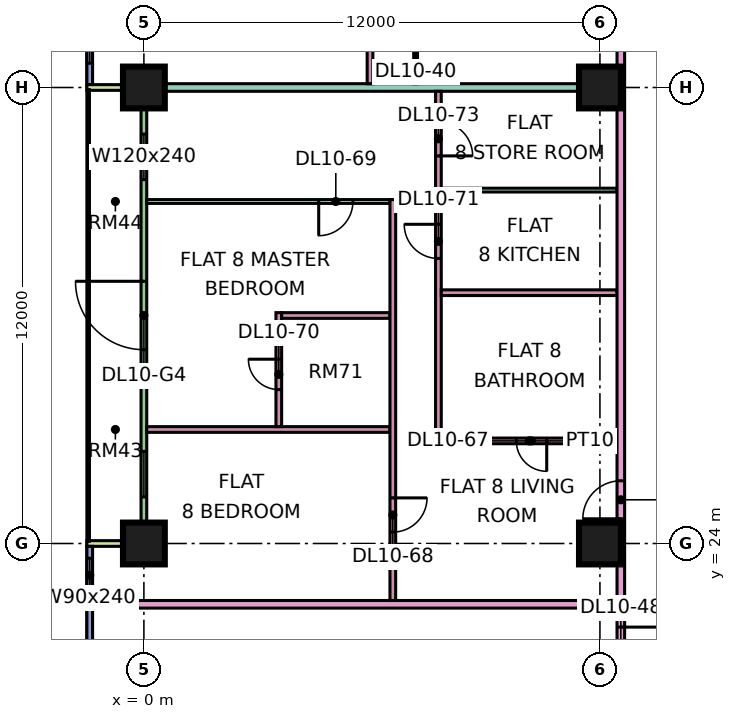
"""IFC4 building model, lengths in metres.
Left out: names, types, materials, properties, quantities, classifications, styles, units other than length and angle.
Written with IfcOpenShell. Run it as: python <this file> out.ifc"""

import sys

from ifc_helpers import new_model, si_unit, direction, frame, frame_2d, origin, origin_2d, place, context, subcontext, project, spatial, rectangle, extrude, element, fill, save


model = new_model("IFC4")
c1 = context("Model", 3, precision=1e-05, world=origin(), true_north=direction((0.0, 1.0)))
c2 = subcontext(c1, "Body", "Model", "MODEL_VIEW")
j1 = project(units=[si_unit("LENGTHUNIT", "METRE"), si_unit("PLANEANGLEUNIT", "RADIAN")], contexts=[c1])
p1 = place(None, origin())
s1 = spatial("IfcSite", under=j1, at=p1, CompositionType="ELEMENT")
p2 = place(p1, origin())
s2 = spatial("IfcBuilding", under=s1, at=p2, CompositionType="ELEMENT")
p3 = place(p2, frame((0.0, 0.0, 52.65)))
s3 = spatial("IfcBuildingStorey", under=s2, at=p3, CompositionType="ELEMENT", Elevation=52.65)
p4 = place(p3, frame((0.0, 24.0, 0.0), z_axis=(0.0, 0.0, 1.0), x_axis=(1.0, 0.0, 0.0)))
e1 = element("IfcColumn", 1, at=p4, inside=s3, PredefinedType="COLUMN", context=c2, shape_type="SweptSolid", body=[
    extrude(rectangle(XDim=1.1, YDim=1.1, at=origin_2d()), origin(), (0.0, 0.0, 1.0), 3.75),
])
p5 = place(p3, frame((0.0, 36.0, 0.0), z_axis=(0.0, 0.0, 1.0), x_axis=(1.0, 0.0, 0.0)))
e2 = element("IfcColumn", 2, at=p5, inside=s3, PredefinedType="COLUMN", context=c2, shape_type="SweptSolid", body=[
    extrude(rectangle(XDim=1.1, YDim=1.1, at=origin_2d()), origin(), (0.0, 0.0, 1.0), 3.75),
])
for number, where, z_axis, x_axis in (
    (3, (12.0, 24.0, 0.0), (0.0, 0.0, 1.0), (1.0, 0.0, 0.0)),
    (4, (12.0, 36.0, 0.0), (0.0, 0.0, 1.0), (1.0, 0.0, 0.0)),
):
    element("IfcColumn", number, at=place(p3, frame(where, z_axis=z_axis, x_axis=x_axis)), inside=s3, PredefinedType="COLUMN", context=c2, shape_type="SweptSolid", body=[
        extrude(rectangle(XDim=1.1, YDim=1.1, at=origin_2d()), origin(), (0.0, 0.0, 1.0), 3.75),
    ])
p6 = place(p3, frame((-1.425, 47.925, 0.0), z_axis=(0.0, 0.0, 1.0), x_axis=(0.0, -1.0, 0.0)))
e5 = element("IfcWall", 5, at=p6, inside=s3, PredefinedType="SOLIDWALL", context=c2, shape_type="SweptSolid", body=[
    extrude(rectangle(XDim=11.85, YDim=0.15, at=frame_2d((5.925, 0.0))), origin(), (0.0, 0.0, 1.0), 3.35),
])
p7 = place(p6, frame((0.562, 0.0, 0.45)))
e6 = element("IfcOpeningElement", 6, at=p7, cuts=e5, PredefinedType="OPENING", context=c2, shape_type="SweptSolid", body=[
    extrude(rectangle(XDim=1.8, YDim=2.4, at=frame_2d((0.9, 1.2))), frame((0.0, 0.085, 0.0), z_axis=(0.0, -1.0, 0.0), x_axis=(1.0, 0.0, 0.0)), (0.0, 0.0, 1.0), 0.17),
])
p8 = place(p6, frame((4.425, 0.0, 0.45)))
e7 = element("IfcOpeningElement", 7, at=p8, cuts=e5, PredefinedType="OPENING", context=c2, shape_type="SweptSolid", body=[
    extrude(rectangle(XDim=3.0, YDim=2.4, at=frame_2d((1.5, 1.2))), frame((0.0, 0.085, 0.0), z_axis=(0.0, -1.0, 0.0), x_axis=(1.0, 0.0, 0.0)), (0.0, 0.0, 1.0), 0.17),
])
p9 = place(p6, frame((9.488, 0.0, 0.45)))
e8 = element("IfcOpeningElement", 8, at=p9, cuts=e5, PredefinedType="OPENING", context=c2, shape_type="SweptSolid", body=[
    extrude(rectangle(XDim=1.8, YDim=2.4, at=frame_2d((0.9, 1.2))), frame((0.0, 0.085, 0.0), z_axis=(0.0, -1.0, 0.0), x_axis=(1.0, 0.0, 0.0)), (0.0, 0.0, 1.0), 0.17),
])
p10 = place(p3, frame((0.0, 35.925, 0.0), z_axis=(0.0, 0.0, 1.0), x_axis=(0.0, -1.0, 0.0)))
e9 = element("IfcWall", 9, at=p10, inside=s3, PredefinedType="SOLIDWALL", context=c2, shape_type="SweptSolid", body=[
    extrude(rectangle(XDim=11.85, YDim=0.15, at=frame_2d((5.925, 0.0))), origin(), (0.0, 0.0, 1.0), 3.35),
])
p11 = place(p10, frame((1.15, 0.0, 0.45)))
e10 = element("IfcOpeningElement", 10, at=p11, cuts=e9, PredefinedType="OPENING", context=c2, shape_type="SweptSolid", body=[
    extrude(rectangle(XDim=1.2, YDim=2.4, at=frame_2d((0.6, 1.2))), frame((0.0, 0.085, 0.0), z_axis=(0.0, -1.0, 0.0), x_axis=(1.0, 0.0, 0.0)), (0.0, 0.0, 1.0), 0.17),
])
p12 = place(p10, frame((5.025, 0.0, 0.0)))
e11 = element("IfcOpeningElement", 11, at=p12, cuts=e9, PredefinedType="OPENING", context=c2, shape_type="SweptSolid", body=[
    extrude(rectangle(XDim=1.8, YDim=2.4, at=frame_2d((0.9, 1.2))), frame((0.0, 0.085, 0.0), z_axis=(0.0, -1.0, 0.0), x_axis=(1.0, 0.0, 0.0)), (0.0, 0.0, 1.0), 0.17),
])
p13 = place(p10, frame((9.5, 0.0, 0.45)))
e12 = element("IfcOpeningElement", 12, at=p13, cuts=e9, PredefinedType="OPENING", context=c2, shape_type="SweptSolid", body=[
    extrude(rectangle(XDim=1.2, YDim=2.4, at=frame_2d((0.6, 1.2))), frame((0.0, 0.085, 0.0), z_axis=(0.0, -1.0, 0.0), x_axis=(1.0, 0.0, 0.0)), (0.0, 0.0, 1.0), 0.17),
])
for number, where, z_axis, x_axis in (
    (13, (-1.5, 36.0, 0.0), (0.0, 0.0, 1.0), (1.0, 0.0, 0.0)),
    (14, (-1.5, 24.0, 0.0), (0.0, 0.0, 1.0), (1.0, 0.0, 0.0)),
):
    element("IfcWall", number, at=place(p3, frame(where, z_axis=z_axis, x_axis=x_axis)), inside=s3, PredefinedType="SOLIDWALL", context=c2, shape_type="SweptSolid", body=[
        extrude(rectangle(XDim=1.5, YDim=0.15, at=frame_2d((0.75, 0.0))), origin(), (0.0, 0.0, 1.0), 3.35),
    ])
p14 = place(p3, frame((-1.425, 23.925, 0.0), z_axis=(0.0, 0.0, 1.0), x_axis=(0.0, -1.0, 0.0)))
e15 = element("IfcWall", 15, at=p14, inside=s3, PredefinedType="SOLIDWALL", context=c2, shape_type="SweptSolid", body=[
    extrude(rectangle(XDim=11.425, YDim=0.15, at=frame_2d((5.712, 0.0))), origin(), (0.0, 0.0, 1.0), 3.35),
])
p15 = place(p14, frame((0.312, 0.0, 0.45)))
e16 = element("IfcOpeningElement", 16, at=p15, cuts=e15, PredefinedType="OPENING", context=c2, shape_type="SweptSolid", body=[
    extrude(rectangle(XDim=0.9, YDim=2.4, at=frame_2d((0.45, 1.2))), frame((0.0, 0.085, 0.0), z_axis=(0.0, -1.0, 0.0), x_axis=(1.0, 0.0, 0.0)), (0.0, 0.0, 1.0), 0.17),
])
p16 = place(p14, frame((6.175, 0.0, 0.45)))
e17 = element("IfcOpeningElement", 17, at=p16, cuts=e15, PredefinedType="OPENING", context=c2, shape_type="SweptSolid", body=[
    extrude(rectangle(XDim=3.0, YDim=2.4, at=frame_2d((1.5, 1.2))), frame((0.0, 0.085, 0.0), z_axis=(0.0, -1.0, 0.0), x_axis=(1.0, 0.0, 0.0)), (0.0, 0.0, 1.0), 0.17),
])
p17 = place(p3, frame((-1.35, 22.4, 0.0), z_axis=(0.0, 0.0, 1.0), x_axis=(1.0, 0.0, 0.0)))
e18 = element("IfcWall", 18, at=p17, inside=s3, PredefinedType="PARTITIONING", context=c2, shape_type="SweptSolid", body=[
    extrude(rectangle(XDim=13.8, YDim=0.2, at=frame_2d((6.9, 0.0))), origin(), (0.0, 0.0, 1.0), 3.35),
])
e19 = element("IfcWall", 19, at=p5, inside=s3, PredefinedType="PARTITIONING", context=c2, shape_type="SweptSolid", body=[
    extrude(rectangle(XDim=12.45, YDim=0.2, at=frame_2d((6.225, 0.0))), origin(), (0.0, 0.0, 1.0), 3.35),
])
p18 = place(p3, frame((0.074, 27.0, 0.0), z_axis=(0.0, 0.0, 1.0), x_axis=(1.0, 0.0, 0.0)))
e20 = element("IfcWall", 20, at=p18, inside=s3, PredefinedType="PARTITIONING", context=c2, shape_type="SweptSolid", body=[
    extrude(rectangle(XDim=6.401, YDim=0.15, at=frame_2d((3.201, 0.0))), origin(), (0.0, 0.0, 1.0), 3.35),
])
p19 = place(p3, frame((0.074, 33.0, 0.0), z_axis=(0.0, 0.0, 1.0), x_axis=(1.0, 0.0, 0.0)))
e21 = element("IfcWall", 21, at=p19, inside=s3, PredefinedType="PARTITIONING", context=c2, shape_type="SweptSolid", body=[
    extrude(rectangle(XDim=6.401, YDim=0.1, at=frame_2d((3.201, 0.0))), origin(), (0.0, 0.0, 1.0), 3.35),
])
p20 = place(p19, frame((4.526, 0.0, 0.0)))
e22 = element("IfcOpeningElement", 22, at=p20, cuts=e21, PredefinedType="OPENING", context=c2, shape_type="SweptSolid", body=[
    extrude(rectangle(XDim=0.9, YDim=2.1, at=frame_2d((0.45, 1.05))), frame((0.0, 0.06, 0.0), z_axis=(0.0, -1.0, 0.0), x_axis=(1.0, 0.0, 0.0)), (0.0, 0.0, 1.0), 0.12),
])
p21 = place(p3, frame((3.55, 27.075, 0.0), z_axis=(0.0, 0.0, 1.0), x_axis=(0.0, 1.0, 0.0)))
e23 = element("IfcWall", 23, at=p21, inside=s3, PredefinedType="PARTITIONING", context=c2, shape_type="SweptSolid", body=[
    extrude(rectangle(XDim=3.0, YDim=0.15, at=frame_2d((1.5, 0.0))), origin(), (0.0, 0.0, 1.0), 3.35),
])
p22 = place(p21, frame((0.975, 0.0, 0.0)))
e24 = element("IfcOpeningElement", 24, at=p22, cuts=e23, PredefinedType="OPENING", context=c2, shape_type="SweptSolid", body=[
    extrude(rectangle(XDim=0.8, YDim=2.1, at=frame_2d((0.4, 1.05))), frame((0.0, 0.085, 0.0), z_axis=(0.0, -1.0, 0.0), x_axis=(1.0, 0.0, 0.0)), (0.0, 0.0, 1.0), 0.17),
])
p23 = place(p3, frame((3.625, 30.0, 0.0), z_axis=(0.0, 0.0, 1.0), x_axis=(1.0, 0.0, 0.0)))
e25 = element("IfcWall", 25, at=p23, inside=s3, PredefinedType="PARTITIONING", context=c2, shape_type="SweptSolid", body=[
    extrude(rectangle(XDim=2.85, YDim=0.15, at=frame_2d((1.425, 0.0))), origin(), (0.0, 0.0, 1.0), 3.35),
])
p24 = place(p3, frame((5.95, 36.1, 0.0), z_axis=(0.0, 0.0, 1.0), x_axis=(0.0, 1.0, 0.0)))
e26 = element("IfcWall", 26, at=p24, inside=s3, PredefinedType="PARTITIONING", context=c2, shape_type="SweptSolid", body=[
    extrude(rectangle(XDim=8.95, YDim=0.15, at=frame_2d((4.475, 0.0))), origin(), (0.0, 0.0, 1.0), 3.35),
])
p25 = place(p24, frame((0.95, 0.0, 0.0)))
e27 = element("IfcOpeningElement", 27, at=p25, cuts=e26, PredefinedType="OPENING", context=c2, shape_type="SweptSolid", body=[
    extrude(rectangle(XDim=0.9, YDim=2.1, at=frame_2d((0.45, 1.05))), frame((0.0, 0.085, 0.0), z_axis=(0.0, -1.0, 0.0), x_axis=(1.0, 0.0, 0.0)), (0.0, 0.0, 1.0), 0.17),
])
p26 = place(p24, frame((6.95, 0.0, 0.0)))
e28 = element("IfcOpeningElement", 28, at=p26, cuts=e26, PredefinedType="OPENING", context=c2, shape_type="SweptSolid", body=[
    extrude(rectangle(XDim=0.9, YDim=2.1, at=frame_2d((0.45, 1.05))), frame((0.0, 0.085, 0.0), z_axis=(0.0, -1.0, 0.0), x_axis=(1.0, 0.0, 0.0)), (0.0, 0.0, 1.0), 0.17),
])
p27 = place(p3, frame((6.55, 22.5, 0.0), z_axis=(0.0, 0.0, 1.0), x_axis=(0.0, 1.0, 0.0)))
e29 = element("IfcWall", 29, at=p27, inside=s3, PredefinedType="PARTITIONING", context=c2, shape_type="SweptSolid", body=[
    extrude(rectangle(XDim=10.55, YDim=0.15, at=frame_2d((5.275, 0.0))), origin(), (0.0, 0.0, 1.0), 3.35),
])
p28 = place(p27, frame((1.8, 0.0, 0.0)))
e30 = element("IfcOpeningElement", 30, at=p28, cuts=e29, PredefinedType="OPENING", context=c2, shape_type="SweptSolid", body=[
    extrude(rectangle(XDim=0.9, YDim=2.1, at=frame_2d((0.45, 1.05))), frame((0.0, 0.085, 0.0), z_axis=(0.0, -1.0, 0.0), x_axis=(1.0, 0.0, 0.0)), (0.0, 0.0, 1.0), 0.17),
])
p29 = place(p3, frame((7.15, 36.1, 0.0), z_axis=(0.0, 0.0, 1.0), x_axis=(0.0, 1.0, 0.0)))
e31 = element("IfcWall", 31, at=p29, inside=s3, PredefinedType="PARTITIONING", context=c2, shape_type="SweptSolid", body=[
    extrude(rectangle(XDim=2.9, YDim=0.1, at=frame_2d((1.45, 0.0))), origin(), (0.0, 0.0, 1.0), 3.35),
])
p30 = place(p29, frame((0.95, 0.0, 0.0)))
e32 = element("IfcOpeningElement", 32, at=p30, cuts=e31, PredefinedType="OPENING", context=c2, shape_type="SweptSolid", body=[
    extrude(rectangle(XDim=0.9, YDim=2.1, at=frame_2d((0.45, 1.05))), frame((0.0, 0.06, 0.0), z_axis=(0.0, -1.0, 0.0), x_axis=(1.0, 0.0, 0.0)), (0.0, 0.0, 1.0), 0.12),
])
p31 = place(p3, frame((7.75, 26.625, 0.0), z_axis=(0.0, 0.0, 1.0), x_axis=(0.0, 1.0, 0.0)))
e33 = element("IfcWall", 33, at=p31, inside=s3, PredefinedType="PARTITIONING", context=c2, shape_type="SweptSolid", body=[
    extrude(rectangle(XDim=9.275, YDim=0.15, at=frame_2d((4.637, 0.0))), origin(), (0.0, 0.0, 1.0), 3.35),
])
p32 = place(p31, frame((4.875, 0.0, 0.0)))
e34 = element("IfcOpeningElement", 34, at=p32, cuts=e33, PredefinedType="OPENING", context=c2, shape_type="SweptSolid", body=[
    extrude(rectangle(XDim=0.9, YDim=2.1, at=frame_2d((0.45, 1.05))), frame((0.0, 0.085, 0.0), z_axis=(0.0, -1.0, 0.0), x_axis=(1.0, 0.0, 0.0)), (0.0, 0.0, 1.0), 0.17),
])
p33 = place(p31, frame((7.575, 0.0, 0.0)))
e35 = element("IfcOpeningElement", 35, at=p33, cuts=e33, PredefinedType="OPENING", context=c2, shape_type="SweptSolid", body=[
    extrude(rectangle(XDim=0.9, YDim=2.1, at=frame_2d((0.45, 1.05))), frame((0.0, 0.085, 0.0), z_axis=(0.0, -1.0, 0.0), x_axis=(1.0, 0.0, 0.0)), (0.0, 0.0, 1.0), 0.17),
])
p34 = place(p3, frame((7.825, 26.7, 0.0), z_axis=(0.0, 0.0, 1.0), x_axis=(1.0, 0.0, 0.0)))
e36 = element("IfcWall", 36, at=p34, inside=s3, PredefinedType="PARTITIONING", context=c2, shape_type="SweptSolid", body=[
    extrude(rectangle(XDim=4.625, YDim=0.15, at=frame_2d((2.312, 0.0))), origin(), (0.0, 0.0, 1.0), 3.35),
])
p35 = place(p34, frame((1.975, 0.0, 0.0)))
e37 = element("IfcOpeningElement", 37, at=p35, cuts=e36, PredefinedType="OPENING", context=c2, shape_type="SweptSolid", body=[
    extrude(rectangle(XDim=0.8, YDim=2.1, at=frame_2d((0.4, 1.05))), frame((0.0, 0.085, 0.0), z_axis=(0.0, -1.0, 0.0), x_axis=(1.0, 0.0, 0.0)), (0.0, 0.0, 1.0), 0.17),
])
p36 = place(p3, frame((7.825, 30.6, 0.0), z_axis=(0.0, 0.0, 1.0), x_axis=(1.0, 0.0, 0.0)))
e38 = element("IfcWall", 38, at=p36, inside=s3, PredefinedType="PARTITIONING", context=c2, shape_type="SweptSolid", body=[
    extrude(rectangle(XDim=4.625, YDim=0.15, at=frame_2d((2.312, 0.0))), origin(), (0.0, 0.0, 1.0), 3.35),
])
p37 = place(p3, frame((7.825, 33.3, 0.0), z_axis=(0.0, 0.0, 1.0), x_axis=(1.0, 0.0, 0.0)))
e39 = element("IfcWall", 39, at=p37, inside=s3, PredefinedType="PARTITIONING", context=c2, shape_type="SweptSolid", body=[
    extrude(rectangle(XDim=4.625, YDim=0.1, at=frame_2d((2.312, 0.0))), origin(), (0.0, 0.0, 1.0), 3.35),
])
p38 = place(p3, frame((12.55, 20.0, 0.0), z_axis=(0.0, 0.0, 1.0), x_axis=(0.0, 1.0, 0.0)))
e40 = element("IfcWall", 40, at=p38, inside=s3, PredefinedType="PARTITIONING", context=c2, shape_type="SweptSolid", body=[
    extrude(rectangle(XDim=19.0, YDim=0.2, at=frame_2d((9.5, 0.0))), origin(), (0.0, 0.0, 1.0), 3.35),
])
p39 = place(p38, frame((0.6, 0.0, 0.0)))
e41 = element("IfcOpeningElement", 41, at=p39, cuts=e40, PredefinedType="OPENING", context=c2, shape_type="SweptSolid", body=[
    extrude(rectangle(XDim=1.2, YDim=2.1, at=frame_2d((0.6, 1.05))), frame((0.0, 0.11, 0.0), z_axis=(0.0, -1.0, 0.0), x_axis=(1.0, 0.0, 0.0)), (0.0, 0.0, 1.0), 0.22),
])
p40 = place(p38, frame((4.65, 0.0, 0.0)))
e42 = element("IfcOpeningElement", 42, at=p40, cuts=e40, PredefinedType="OPENING", context=c2, shape_type="SweptSolid", body=[
    extrude(rectangle(XDim=1.0, YDim=2.1, at=frame_2d((0.5, 1.05))), frame((0.0, 0.11, 0.0), z_axis=(0.0, -1.0, 0.0), x_axis=(1.0, 0.0, 0.0)), (0.0, 0.0, 1.0), 0.22),
])
p41 = place(p9, origin())
e43 = element("IfcWindow", 43, at=p41, inside=s3, PartitioningType="SINGLE_PANEL", PredefinedType="WINDOW", context=c2, shape_type="SweptSolid", body=[
    extrude(rectangle(XDim=1.8, YDim=2.4, at=frame_2d((0.9, 1.2))), frame((0.0, 0.03, 0.0), z_axis=(0.0, -1.0, 0.0), x_axis=(1.0, 0.0, 0.0)), (0.0, 0.0, 1.0), 0.06),
])
fill(e8, e43)
p42 = place(p11, origin())
e44 = element("IfcWindow", 44, at=p42, inside=s3, PartitioningType="SINGLE_PANEL", PredefinedType="WINDOW", context=c2, shape_type="SweptSolid", body=[
    extrude(rectangle(XDim=1.2, YDim=2.4, at=frame_2d((0.6, 1.2))), frame((0.0, 0.03, 0.0), z_axis=(0.0, -1.0, 0.0), x_axis=(1.0, 0.0, 0.0)), (0.0, 0.0, 1.0), 0.06),
])
fill(e10, e44)
p43 = place(p12, frame((1.8, 0.0, 0.0), z_axis=(0.0, 0.0, 1.0), x_axis=(-1.0, 0.0, 0.0)))
e45 = element("IfcDoor", 45, at=p43, inside=s3, OperationType="DOUBLE_DOOR_SINGLE_SWING", PredefinedType="DOOR", context=c2, shape_type="SweptSolid", body=[
    extrude(rectangle(XDim=1.8, YDim=2.4, at=frame_2d((0.9, 1.2))), frame((0.0, 0.025, 0.0), z_axis=(0.0, -1.0, 0.0), x_axis=(1.0, 0.0, 0.0)), (0.0, 0.0, 1.0), 0.05),
])
fill(e11, e45)
p44 = place(p13, origin())
e46 = element("IfcWindow", 46, at=p44, inside=s3, PartitioningType="SINGLE_PANEL", PredefinedType="WINDOW", context=c2, shape_type="SweptSolid", body=[
    extrude(rectangle(XDim=1.2, YDim=2.4, at=frame_2d((0.6, 1.2))), frame((0.0, 0.03, 0.0), z_axis=(0.0, -1.0, 0.0), x_axis=(1.0, 0.0, 0.0)), (0.0, 0.0, 1.0), 0.06),
])
fill(e12, e46)
p45 = place(p15, origin())
e47 = element("IfcWindow", 47, at=p45, inside=s3, PartitioningType="SINGLE_PANEL", PredefinedType="WINDOW", context=c2, shape_type="SweptSolid", body=[
    extrude(rectangle(XDim=0.9, YDim=2.4, at=frame_2d((0.45, 1.2))), frame((0.0, 0.03, 0.0), z_axis=(0.0, -1.0, 0.0), x_axis=(1.0, 0.0, 0.0)), (0.0, 0.0, 1.0), 0.06),
])
fill(e16, e47)
p46 = place(p39, origin())
e48 = element("IfcDoor", 48, at=p46, inside=s3, OperationType="SINGLE_SWING_RIGHT", PredefinedType="DOOR", context=c2, shape_type="SweptSolid", body=[
    extrude(rectangle(XDim=1.2, YDim=2.1, at=frame_2d((0.6, 1.05))), frame((0.0, 0.025, 0.0), z_axis=(0.0, -1.0, 0.0), x_axis=(1.0, 0.0, 0.0)), (0.0, 0.0, 1.0), 0.05),
])
fill(e41, e48)
p47 = place(p35, origin())
e49 = element("IfcDoor", 49, at=p47, inside=s3, OperationType="SINGLE_SWING_RIGHT", PredefinedType="DOOR", context=c2, shape_type="SweptSolid", body=[
    extrude(rectangle(XDim=0.8, YDim=2.1, at=frame_2d((0.4, 1.05))), frame((0.0, 0.025, 0.0), z_axis=(0.0, -1.0, 0.0), x_axis=(1.0, 0.0, 0.0)), (0.0, 0.0, 1.0), 0.05),
])
fill(e37, e49)
p48 = place(p28, origin())
e50 = element("IfcDoor", 50, at=p48, inside=s3, OperationType="SINGLE_SWING_RIGHT", PredefinedType="DOOR", context=c2, shape_type="SweptSolid", body=[
    extrude(rectangle(XDim=0.9, YDim=2.1, at=frame_2d((0.45, 1.05))), frame((0.0, 0.025, 0.0), z_axis=(0.0, -1.0, 0.0), x_axis=(1.0, 0.0, 0.0)), (0.0, 0.0, 1.0), 0.05),
])
fill(e30, e50)
p49 = place(p20, frame((0.9, 0.0, 0.0), z_axis=(0.0, 0.0, 1.0), x_axis=(-1.0, 0.0, 0.0)))
e51 = element("IfcDoor", 51, at=p49, inside=s3, OperationType="SINGLE_SWING_LEFT", PredefinedType="DOOR", context=c2, shape_type="SweptSolid", body=[
    extrude(rectangle(XDim=0.9, YDim=2.1, at=frame_2d((0.45, 1.05))), frame((0.0, 0.025, 0.0), z_axis=(0.0, -1.0, 0.0), x_axis=(1.0, 0.0, 0.0)), (0.0, 0.0, 1.0), 0.05),
])
fill(e22, e51)
p50 = place(p22, frame((0.8, 0.0, 0.0), z_axis=(0.0, 0.0, 1.0), x_axis=(-1.0, 0.0, 0.0)))
e52 = element("IfcDoor", 52, at=p50, inside=s3, OperationType="SINGLE_SWING_RIGHT", PredefinedType="DOOR", context=c2, shape_type="SweptSolid", body=[
    extrude(rectangle(XDim=0.8, YDim=2.1, at=frame_2d((0.4, 1.05))), frame((0.0, 0.025, 0.0), z_axis=(0.0, -1.0, 0.0), x_axis=(1.0, 0.0, 0.0)), (0.0, 0.0, 1.0), 0.05),
])
fill(e24, e52)
p51 = place(p32, frame((0.9, 0.0, 0.0), z_axis=(0.0, 0.0, 1.0), x_axis=(-1.0, 0.0, 0.0)))
e53 = element("IfcDoor", 53, at=p51, inside=s3, OperationType="SINGLE_SWING_RIGHT", PredefinedType="DOOR", context=c2, shape_type="SweptSolid", body=[
    extrude(rectangle(XDim=0.9, YDim=2.1, at=frame_2d((0.45, 1.05))), frame((0.0, 0.025, 0.0), z_axis=(0.0, -1.0, 0.0), x_axis=(1.0, 0.0, 0.0)), (0.0, 0.0, 1.0), 0.05),
])
fill(e34, e53)
p52 = place(p40, origin())
e54 = element("IfcDoor", 54, at=p52, inside=s3, OperationType="SINGLE_SWING_LEFT", PredefinedType="DOOR", context=c2, shape_type="SweptSolid", body=[
    extrude(rectangle(XDim=1.0, YDim=2.1, at=frame_2d((0.5, 1.05))), frame((0.0, 0.025, 0.0), z_axis=(0.0, -1.0, 0.0), x_axis=(1.0, 0.0, 0.0)), (0.0, 0.0, 1.0), 0.05),
])
fill(e42, e54)
p53 = place(p33, frame((0.9, 0.0, 0.0), z_axis=(0.0, 0.0, 1.0), x_axis=(-1.0, 0.0, 0.0)))
e55 = element("IfcDoor", 55, at=p53, inside=s3, OperationType="SINGLE_SWING_LEFT", PredefinedType="DOOR", context=c2, shape_type="SweptSolid", body=[
    extrude(rectangle(XDim=0.9, YDim=2.1, at=frame_2d((0.45, 1.05))), frame((0.0, 0.025, 0.0), z_axis=(0.0, -1.0, 0.0), x_axis=(1.0, 0.0, 0.0)), (0.0, 0.0, 1.0), 0.05),
])
fill(e35, e55)
save(model, sys.argv[1])
